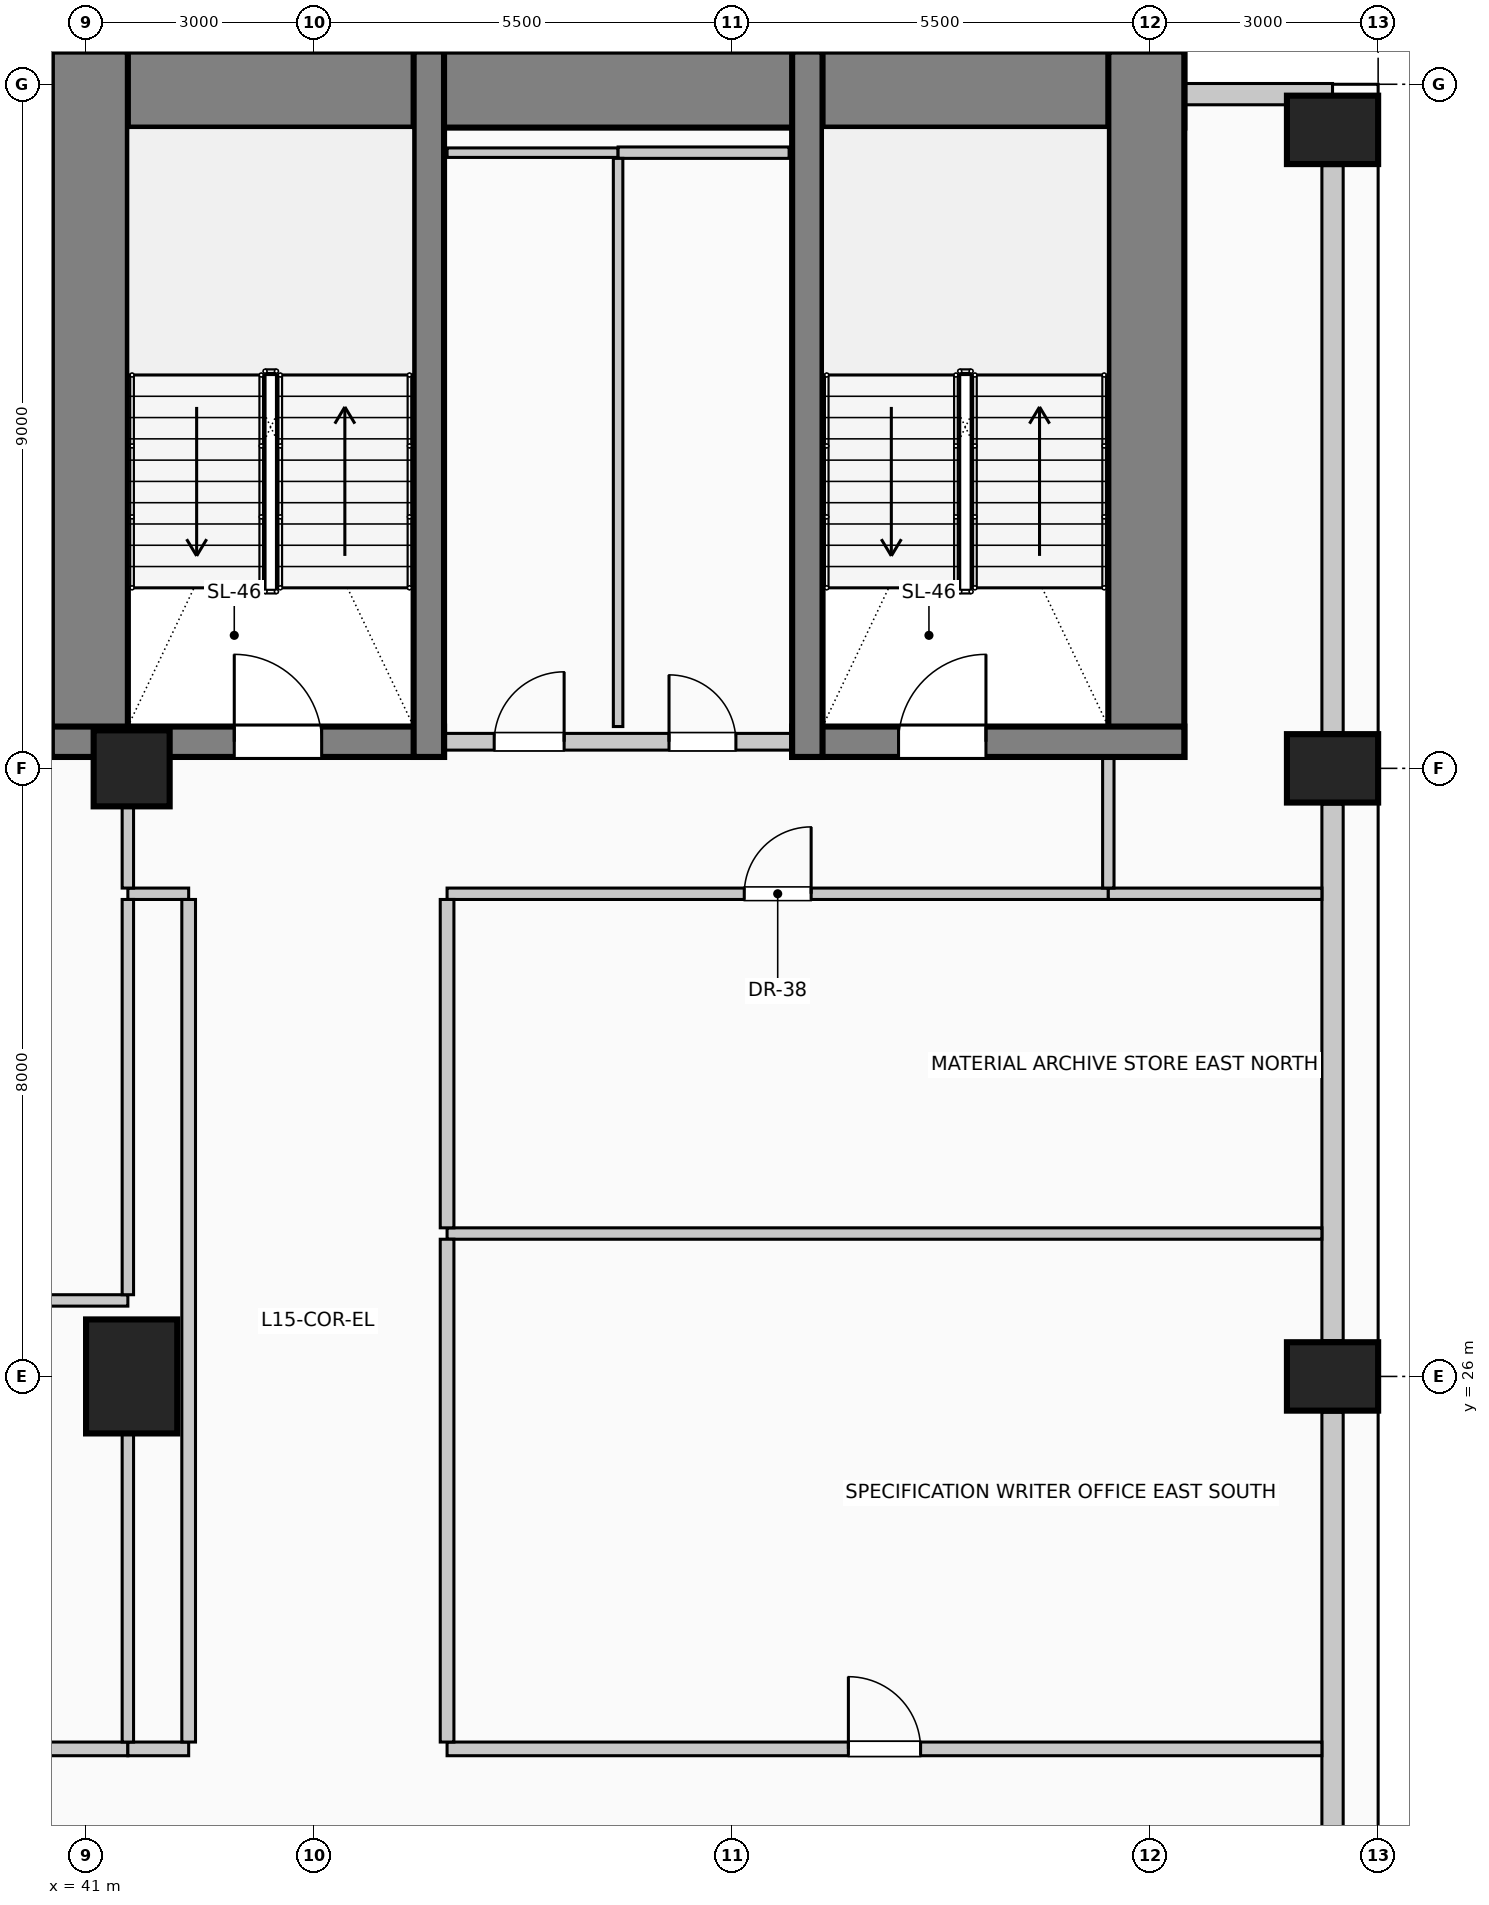
"""IFC4 building model, lengths in metres.
Left out: names, types, materials, properties, quantities, classifications, styles, units other than length and angle.
Written with IfcOpenShell. Run it as: python <this file> out.ifc"""

import sys

from ifc_helpers import new_model, si_unit, direction, frame, frame_2d, origin, origin_2d, place, context, subcontext, project, spatial, rectangle, circle, extrude, element, fill, save


model = new_model("IFC4")
c1 = context("Model", 3, precision=1e-05, world=origin(), true_north=direction((0.0, 1.0)))
c2 = subcontext(c1, "Body", "Model", "MODEL_VIEW")
j1 = project(units=[si_unit("LENGTHUNIT", "METRE"), si_unit("PLANEANGLEUNIT", "RADIAN")], contexts=[c1])
p1 = place(None, origin())
s1 = spatial("IfcSite", under=j1, at=p1, CompositionType="ELEMENT")
p2 = place(p1, origin())
s2 = spatial("IfcBuilding", under=s1, at=p2, CompositionType="ELEMENT")
p3 = place(p2, frame((0.0, 0.0, 62.6)))
s3 = spatial("IfcBuildingStorey", under=s2, at=p3, CompositionType="ELEMENT", Elevation=62.6)
p4 = place(p3, frame((40.55, 42.93, 0.0), z_axis=(0.0, 0.0, 1.0), x_axis=(1.0, 0.0, 0.0)))
e1 = element("IfcWall", 1, at=p4, inside=s3, PredefinedType="SHEAR", context=c2, shape_type="SweptSolid", body=[
    extrude(rectangle(XDim=14.9, YDim=1.0, at=frame_2d((7.45, 0.0))), origin(), (0.0, 0.0, 1.0), 4.0),
])
for number, where, z_axis, x_axis in (
    (2, (41.05, 34.15, 0.0), (0.0, 0.0, 1.0), (0.0, 1.0, 0.0)),
    (3, (54.95, 34.15, 0.0), (0.0, 0.0, 1.0), (0.0, 1.0, 0.0)),
):
    element("IfcWall", number, at=place(p3, frame(where, z_axis=z_axis, x_axis=x_axis)), inside=s3, PredefinedType="SHEAR", context=c2, shape_type="SweptSolid", body=[
        extrude(rectangle(XDim=9.28, YDim=1.0, at=frame_2d((4.64, 0.0))), origin(), (0.0, 0.0, 1.0), 4.0),
    ])
p5 = place(p3, frame((40.55, 34.35, 0.0), z_axis=(0.0, 0.0, 1.0), x_axis=(1.0, 0.0, 0.0)))
e4 = element("IfcWall", 4, at=p5, inside=s3, PredefinedType="SHEAR", context=c2, shape_type="SweptSolid", body=[
    extrude(rectangle(XDim=5.16, YDim=0.4, at=frame_2d((2.58, 0.0))), origin(), (0.0, 0.0, 1.0), 4.0),
])
p6 = place(p5, frame((2.4, 0.0, 0.0)))
e5 = element("IfcOpeningElement", 5, at=p6, cuts=e4, PredefinedType="OPENING", context=c2, shape_type="SweptSolid", body=[
    extrude(rectangle(XDim=1.15, YDim=2.2, at=frame_2d((0.575, 1.1))), frame((0.0, 0.21, 0.0), z_axis=(0.0, -1.0, 0.0), x_axis=(1.0, 0.0, 0.0)), (0.0, 0.0, 1.0), 0.42),
])
p7 = place(p3, frame((45.51, 34.15, 0.0), z_axis=(0.0, 0.0, 1.0), x_axis=(0.0, 1.0, 0.0)))
e6 = element("IfcWall", 6, at=p7, inside=s3, PredefinedType="SHEAR", context=c2, shape_type="SweptSolid", body=[
    extrude(rectangle(XDim=9.28, YDim=0.4, at=frame_2d((4.64, 0.0))), origin(), (0.0, 0.0, 1.0), 4.0),
])
p8 = place(p3, frame((50.29, 34.35, 0.0), z_axis=(0.0, 0.0, 1.0), x_axis=(1.0, 0.0, 0.0)))
e7 = element("IfcWall", 7, at=p8, inside=s3, PredefinedType="SHEAR", context=c2, shape_type="SweptSolid", body=[
    extrude(rectangle(XDim=5.16, YDim=0.4, at=frame_2d((2.58, 0.0))), origin(), (0.0, 0.0, 1.0), 4.0),
])
p9 = place(p8, frame((1.4, 0.0, 0.0)))
e8 = element("IfcOpeningElement", 8, at=p9, cuts=e7, PredefinedType="OPENING", context=c2, shape_type="SweptSolid", body=[
    extrude(rectangle(XDim=1.15, YDim=2.2, at=frame_2d((0.575, 1.1))), frame((0.0, 0.21, 0.0), z_axis=(0.0, -1.0, 0.0), x_axis=(1.0, 0.0, 0.0)), (0.0, 0.0, 1.0), 0.42),
])
p10 = place(p3, frame((50.49, 34.15, 0.0), z_axis=(0.0, 0.0, 1.0), x_axis=(0.0, 1.0, 0.0)))
e9 = element("IfcWall", 9, at=p10, inside=s3, PredefinedType="SHEAR", context=c2, shape_type="SweptSolid", body=[
    extrude(rectangle(XDim=9.28, YDim=0.4, at=frame_2d((4.64, 0.0))), origin(), (0.0, 0.0, 1.0), 4.0),
])
for number, where, z_axis, x_axis in (
    (10, (57.4, 26.0, 0.0), (0.0, 0.0, 1.0), (0.0, 1.0, 0.0)),
    (11, (57.4, 34.0, 0.0), (0.0, 0.0, 1.0), (0.0, 1.0, 0.0)),
    (12, (57.4, 42.4, 0.0), (0.0, 0.0, 1.0), (0.0, 1.0, 0.0)),
):
    element("IfcColumn", number, at=place(p3, frame(where, z_axis=z_axis, x_axis=x_axis)), inside=s3, PredefinedType="COLUMN", context=c2, shape_type="SweptSolid", body=[
        extrude(rectangle(XDim=0.9, YDim=1.2, at=origin_2d()), origin(), (0.0, 0.0, 1.0), 4.0),
    ])
p11 = place(p3, frame((41.6, 26.0, 0.0), z_axis=(0.0, 0.0, 1.0), x_axis=(1.0, 0.0, 0.0)))
e13 = element("IfcColumn", 13, at=p11, inside=s3, PredefinedType="COLUMN", context=c2, shape_type="SweptSolid", body=[
    extrude(rectangle(XDim=1.2, YDim=1.5, at=origin_2d()), origin(), (0.0, 0.0, 1.0), 4.0),
])
p12 = place(p3, frame((41.6, 34.0, 0.0), z_axis=(0.0, 0.0, 1.0), x_axis=(1.0, 0.0, 0.0)))
e14 = element("IfcColumn", 14, at=p12, inside=s3, PredefinedType="COLUMN", context=c2, shape_type="SweptSolid", body=[
    extrude(circle(Radius=0.5, at=origin_2d()), origin(), (0.0, 0.0, 1.0), 4.0),
])
for number, where, z_axis, x_axis in (
    (15, (57.4, 25.53, 0.0), (0.0, 0.0, 1.0), (0.0, -1.0, 0.0)),
    (16, (57.4, 33.53, 0.0), (0.0, 0.0, 1.0), (0.0, -1.0, 0.0)),
):
    element("IfcWall", number, at=place(p3, frame(where, z_axis=z_axis, x_axis=x_axis)), inside=s3, PredefinedType="SOLIDWALL", context=c2, shape_type="SweptSolid", body=[
        extrude(rectangle(XDim=7.06, YDim=0.28, at=frame_2d((3.53, 0.0))), origin(), (0.0, 0.0, 1.0), 2.85),
    ])
p13 = place(p3, frame((57.4, 41.93, 0.0), z_axis=(0.0, 0.0, 1.0), x_axis=(0.0, -1.0, 0.0)))
e17 = element("IfcWall", 17, at=p13, inside=s3, PredefinedType="SOLIDWALL", context=c2, shape_type="SweptSolid", body=[
    extrude(rectangle(XDim=7.46, YDim=0.28, at=frame_2d((3.73, 0.0))), origin(), (0.0, 0.0, 1.0), 2.85),
])
p14 = place(p3, frame((55.455, 42.87, 0.0), z_axis=(0.0, 0.0, 1.0), x_axis=(1.0, 0.0, 0.0)))
e18 = element("IfcWall", 18, at=p14, inside=s3, PredefinedType="SOLIDWALL", context=c2, shape_type="SweptSolid", body=[
    extrude(rectangle(XDim=1.945, YDim=0.28, at=frame_2d((0.972, 0.0))), origin(), (0.0, 0.0, 1.0), 3.7),
])
p15 = place(p3, frame((45.72, 34.35, 0.0), z_axis=(0.0, 0.0, 1.0), x_axis=(1.0, 0.0, 0.0)))
e19 = element("IfcWall", 19, at=p15, inside=s3, PredefinedType="PARTITIONING", context=c2, shape_type="SweptSolid", body=[
    extrude(rectangle(XDim=4.56, YDim=0.22, at=frame_2d((2.28, 0.0))), origin(), (0.0, 0.0, 1.0), 3.7),
])
p16 = place(p15, frame((0.65, 0.0, 0.0)))
e20 = element("IfcOpeningElement", 20, at=p16, cuts=e19, PredefinedType="OPENING", context=c2, shape_type="SweptSolid", body=[
    extrude(rectangle(XDim=0.92, YDim=2.1, at=frame_2d((0.46, 1.05))), frame((0.0, 0.12, 0.0), z_axis=(0.0, -1.0, 0.0), x_axis=(1.0, 0.0, 0.0)), (0.0, 0.0, 1.0), 0.24),
])
p17 = place(p15, frame((2.95, 0.0, 0.0)))
e21 = element("IfcOpeningElement", 21, at=p17, cuts=e19, PredefinedType="OPENING", context=c2, shape_type="SweptSolid", body=[
    extrude(rectangle(XDim=0.88, YDim=2.1, at=frame_2d((0.44, 1.05))), frame((0.0, 0.12, 0.0), z_axis=(0.0, -1.0, 0.0), x_axis=(1.0, 0.0, 0.0)), (0.0, 0.0, 1.0), 0.24),
])
p18 = place(p3, frame((27.5, 21.1, 0.0), z_axis=(0.0, 0.0, 1.0), x_axis=(1.0, 0.0, 0.0)))
e22 = element("IfcWall", 22, at=p18, inside=s3, PredefinedType="PARTITIONING", context=c2, shape_type="SweptSolid", body=[
    extrude(rectangle(XDim=14.05, YDim=0.18, at=frame_2d((7.025, 0.0))), origin(), (0.0, 0.0, 1.0), 3.7),
])
p19 = place(p18, frame((6.55, 0.0, 0.0)))
e23 = element("IfcOpeningElement", 23, at=p19, cuts=e22, PredefinedType="OPENING", context=c2, shape_type="SweptSolid", body=[
    extrude(rectangle(XDim=0.95, YDim=2.15, at=frame_2d((0.475, 1.075))), frame((0.0, 0.1, 0.0), z_axis=(0.0, -1.0, 0.0), x_axis=(1.0, 0.0, 0.0)), (0.0, 0.0, 1.0), 0.2),
])
p20 = place(p3, frame((41.55, 21.1, 0.0), z_axis=(0.0, 0.0, 1.0), x_axis=(1.0, 0.0, 0.0)))
e24 = element("IfcWall", 24, at=p20, inside=s3, PredefinedType="PARTITIONING", context=c2, shape_type="SweptSolid", body=[
    extrude(rectangle(XDim=0.8, YDim=0.18, at=frame_2d((0.4, 0.0))), origin(), (0.0, 0.0, 1.0), 3.7),
])
p21 = place(p3, frame((45.75, 21.1, 0.0), z_axis=(0.0, 0.0, 1.0), x_axis=(1.0, 0.0, 0.0)))
e25 = element("IfcWall", 25, at=p21, inside=s3, PredefinedType="PARTITIONING", context=c2, shape_type="SweptSolid", body=[
    extrude(rectangle(XDim=11.51, YDim=0.18, at=frame_2d((5.755, 0.0))), origin(), (0.0, 0.0, 1.0), 3.7),
])
p22 = place(p21, frame((5.28, 0.0, 0.0)))
e26 = element("IfcOpeningElement", 26, at=p22, cuts=e25, PredefinedType="OPENING", context=c2, shape_type="SweptSolid", body=[
    extrude(rectangle(XDim=0.95, YDim=2.15, at=frame_2d((0.475, 1.075))), frame((0.0, 0.1, 0.0), z_axis=(0.0, -1.0, 0.0), x_axis=(1.0, 0.0, 0.0)), (0.0, 0.0, 1.0), 0.2),
])
p23 = place(p3, frame((27.5, 27.0, 0.0), z_axis=(0.0, 0.0, 1.0), x_axis=(1.0, 0.0, 0.0)))
e27 = element("IfcWall", 27, at=p23, inside=s3, PredefinedType="PARTITIONING", context=c2, shape_type="SweptSolid", body=[
    extrude(rectangle(XDim=14.05, YDim=0.15, at=frame_2d((7.025, 0.0))), origin(), (0.0, 0.0, 1.0), 3.7),
])
p24 = place(p3, frame((45.75, 27.88, 0.0), z_axis=(0.0, 0.0, 1.0), x_axis=(1.0, 0.0, 0.0)))
e28 = element("IfcWall", 28, at=p24, inside=s3, PredefinedType="PARTITIONING", context=c2, shape_type="SweptSolid", body=[
    extrude(rectangle(XDim=11.51, YDim=0.15, at=frame_2d((5.755, 0.0))), origin(), (0.0, 0.0, 1.0), 3.7),
])
p25 = place(p3, frame((41.55, 32.35, 0.0), z_axis=(0.0, 0.0, 1.0), x_axis=(1.0, 0.0, 0.0)))
e29 = element("IfcWall", 29, at=p25, inside=s3, PredefinedType="PARTITIONING", context=c2, shape_type="SweptSolid", body=[
    extrude(rectangle(XDim=0.8, YDim=0.15, at=frame_2d((0.4, 0.0))), origin(), (0.0, 0.0, 1.0), 3.7),
])
p26 = place(p3, frame((45.75, 32.35, 0.0), z_axis=(0.0, 0.0, 1.0), x_axis=(1.0, 0.0, 0.0)))
e30 = element("IfcWall", 30, at=p26, inside=s3, PredefinedType="PARTITIONING", context=c2, shape_type="SweptSolid", body=[
    extrude(rectangle(XDim=8.7, YDim=0.15, at=frame_2d((4.35, 0.0))), origin(), (0.0, 0.0, 1.0), 3.7),
])
p27 = place(p26, frame((3.91, 0.0, 0.0)))
e31 = element("IfcOpeningElement", 31, at=p27, cuts=e30, PredefinedType="OPENING", context=c2, shape_type="SweptSolid", body=[
    extrude(rectangle(XDim=0.88, YDim=2.1, at=frame_2d((0.44, 1.05))), frame((0.0, 0.085, 0.0), z_axis=(0.0, -1.0, 0.0), x_axis=(1.0, 0.0, 0.0)), (0.0, 0.0, 1.0), 0.17),
])
p28 = place(p3, frame((54.45, 32.35, 0.0), z_axis=(0.0, 0.0, 1.0), x_axis=(1.0, 0.0, 0.0)))
e32 = element("IfcWall", 32, at=p28, inside=s3, PredefinedType="PARTITIONING", context=c2, shape_type="SweptSolid", body=[
    extrude(rectangle(XDim=2.81, YDim=0.15, at=frame_2d((1.405, 0.0))), origin(), (0.0, 0.0, 1.0), 3.7),
])
p29 = place(p3, frame((45.75, 42.1, 0.0), z_axis=(0.0, 0.0, 1.0), x_axis=(1.0, 0.0, 0.0)))
e33 = element("IfcWall", 33, at=p29, inside=s3, PredefinedType="PARTITIONING", context=c2, shape_type="SweptSolid", body=[
    extrude(rectangle(XDim=2.25, YDim=0.125, at=frame_2d((1.125, 0.0))), origin(), (0.0, 0.0, 1.0), 3.7),
])
p30 = place(p3, frame((48.0, 42.1, 0.0), z_axis=(0.0, 0.0, 1.0), x_axis=(1.0, 0.0, 0.0)))
e34 = element("IfcWall", 34, at=p30, inside=s3, PredefinedType="PARTITIONING", context=c2, shape_type="SweptSolid", body=[
    extrude(rectangle(XDim=2.25, YDim=0.15, at=frame_2d((1.125, 0.0))), origin(), (0.0, 0.0, 1.0), 3.7),
])
p31 = place(p3, frame((41.55, 21.19, 0.0), z_axis=(0.0, 0.0, 1.0), x_axis=(0.0, 1.0, 0.0)))
e35 = element("IfcWall", 35, at=p31, inside=s3, PredefinedType="PARTITIONING", context=c2, shape_type="SweptSolid", body=[
    extrude(rectangle(XDim=4.06, YDim=0.15, at=frame_2d((2.03, 0.0))), origin(), (0.0, 0.0, 1.0), 2.995),
])
p32 = place(p3, frame((41.55, 27.075, 0.0), z_axis=(0.0, 0.0, 1.0), x_axis=(0.0, 1.0, 0.0)))
e36 = element("IfcWall", 36, at=p32, inside=s3, PredefinedType="PARTITIONING", context=c2, shape_type="SweptSolid", body=[
    extrude(rectangle(XDim=5.2, YDim=0.15, at=frame_2d((2.6, 0.0))), origin(), (0.0, 0.0, 1.0), 2.995),
])
p33 = place(p3, frame((41.55, 32.425, 0.0), z_axis=(0.0, 0.0, 1.0), x_axis=(0.0, 1.0, 0.0)))
e37 = element("IfcWall", 37, at=p33, inside=s3, PredefinedType="PARTITIONING", context=c2, shape_type="SweptSolid", body=[
    extrude(rectangle(XDim=1.075, YDim=0.15, at=frame_2d((0.538, 0.0))), origin(), (0.0, 0.0, 1.0), 2.995),
])
p34 = place(p3, frame((41.55, 43.43, 0.0), z_axis=(0.0, 0.0, 1.0), x_axis=(0.0, 1.0, 0.0)))
e38 = element("IfcWall", 38, at=p34, inside=s3, PredefinedType="PARTITIONING", context=c2, shape_type="SweptSolid", body=[
    extrude(rectangle(XDim=1.22, YDim=0.15, at=frame_2d((0.61, 0.0))), origin(), (0.0, 0.0, 1.0), 3.7),
])
p35 = place(p3, frame((42.35, 21.19, 0.0), z_axis=(0.0, 0.0, 1.0), x_axis=(0.0, 1.0, 0.0)))
e39 = element("IfcWall", 39, at=p35, inside=s3, PredefinedType="PARTITIONING", context=c2, shape_type="SweptSolid", body=[
    extrude(rectangle(XDim=11.085, YDim=0.18, at=frame_2d((5.542, 0.0))), origin(), (0.0, 0.0, 1.0), 3.7),
])
p36 = place(p3, frame((45.75, 21.19, 0.0), z_axis=(0.0, 0.0, 1.0), x_axis=(0.0, 1.0, 0.0)))
e40 = element("IfcWall", 40, at=p36, inside=s3, PredefinedType="PARTITIONING", context=c2, shape_type="SweptSolid", body=[
    extrude(rectangle(XDim=6.615, YDim=0.18, at=frame_2d((3.308, 0.0))), origin(), (0.0, 0.0, 1.0), 3.7),
])
p37 = place(p3, frame((45.75, 27.955, 0.0), z_axis=(0.0, 0.0, 1.0), x_axis=(0.0, 1.0, 0.0)))
e41 = element("IfcWall", 41, at=p37, inside=s3, PredefinedType="PARTITIONING", context=c2, shape_type="SweptSolid", body=[
    extrude(rectangle(XDim=4.32, YDim=0.18, at=frame_2d((2.16, 0.0))), origin(), (0.0, 0.0, 1.0), 3.7),
])
p38 = place(p3, frame((48.0, 34.55, 0.0), z_axis=(0.0, 0.0, 1.0), x_axis=(0.0, 1.0, 0.0)))
e42 = element("IfcWall", 42, at=p38, inside=s3, PredefinedType="PARTITIONING", context=c2, shape_type="SweptSolid", body=[
    extrude(rectangle(XDim=7.475, YDim=0.125, at=frame_2d((3.737, 0.0))), origin(), (0.0, 0.0, 1.0), 3.7),
])
p39 = place(p3, frame((54.45, 32.425, 0.0), z_axis=(0.0, 0.0, 1.0), x_axis=(0.0, 1.0, 0.0)))
e43 = element("IfcWall", 43, at=p39, inside=s3, PredefinedType="PARTITIONING", context=c2, shape_type="SweptSolid", body=[
    extrude(rectangle(XDim=1.725, YDim=0.15, at=frame_2d((0.862, 0.0))), origin(), (0.0, 0.0, 1.0), 3.7),
])
p40 = place(p6, origin())
e44 = element("IfcDoor", 44, at=p40, inside=s3, OperationType="SINGLE_SWING_LEFT", PredefinedType="DOOR", context=c2, shape_type="SweptSolid", body=[
    extrude(rectangle(XDim=1.15, YDim=2.2, at=frame_2d((0.575, 1.1))), frame((0.0, 0.025, 0.0), z_axis=(0.0, -1.0, 0.0), x_axis=(1.0, 0.0, 0.0)), (0.0, 0.0, 1.0), 0.05),
])
fill(e5, e44)
p41 = place(p16, origin())
e45 = element("IfcDoor", 45, at=p41, inside=s3, OperationType="SINGLE_SWING_RIGHT", PredefinedType="DOOR", context=c2, shape_type="SweptSolid", body=[
    extrude(rectangle(XDim=0.92, YDim=2.1, at=frame_2d((0.46, 1.05))), frame((0.0, 0.025, 0.0), z_axis=(0.0, -1.0, 0.0), x_axis=(1.0, 0.0, 0.0)), (0.0, 0.0, 1.0), 0.05),
])
fill(e20, e45)
p42 = place(p17, origin())
e46 = element("IfcDoor", 46, at=p42, inside=s3, OperationType="SINGLE_SWING_LEFT", PredefinedType="DOOR", context=c2, shape_type="SweptSolid", body=[
    extrude(rectangle(XDim=0.88, YDim=2.1, at=frame_2d((0.44, 1.05))), frame((0.0, 0.025, 0.0), z_axis=(0.0, -1.0, 0.0), x_axis=(1.0, 0.0, 0.0)), (0.0, 0.0, 1.0), 0.05),
])
fill(e21, e46)
p43 = place(p9, origin())
e47 = element("IfcDoor", 47, at=p43, inside=s3, OperationType="SINGLE_SWING_RIGHT", PredefinedType="DOOR", context=c2, shape_type="SweptSolid", body=[
    extrude(rectangle(XDim=1.15, YDim=2.2, at=frame_2d((0.575, 1.1))), frame((0.0, 0.025, 0.0), z_axis=(0.0, -1.0, 0.0), x_axis=(1.0, 0.0, 0.0)), (0.0, 0.0, 1.0), 0.05),
])
fill(e8, e47)
p44 = place(p22, origin())
e48 = element("IfcDoor", 48, at=p44, inside=s3, OperationType="SINGLE_SWING_LEFT", PredefinedType="DOOR", context=c2, shape_type="SweptSolid", body=[
    extrude(rectangle(XDim=0.95, YDim=2.15, at=frame_2d((0.475, 1.075))), frame((0.0, 0.025, 0.0), z_axis=(0.0, -1.0, 0.0), x_axis=(1.0, 0.0, 0.0)), (0.0, 0.0, 1.0), 0.05),
])
fill(e26, e48)
p45 = place(p27, origin())
e49 = element("IfcDoor", 49, at=p45, inside=s3, OperationType="SINGLE_SWING_RIGHT", PredefinedType="DOOR", context=c2, shape_type="SweptSolid", body=[
    extrude(rectangle(XDim=0.88, YDim=2.1, at=frame_2d((0.44, 1.05))), frame((0.0, 0.025, 0.0), z_axis=(0.0, -1.0, 0.0), x_axis=(1.0, 0.0, 0.0)), (0.0, 0.0, 1.0), 0.05),
])
fill(e31, e49)
save(model, sys.argv[1])
